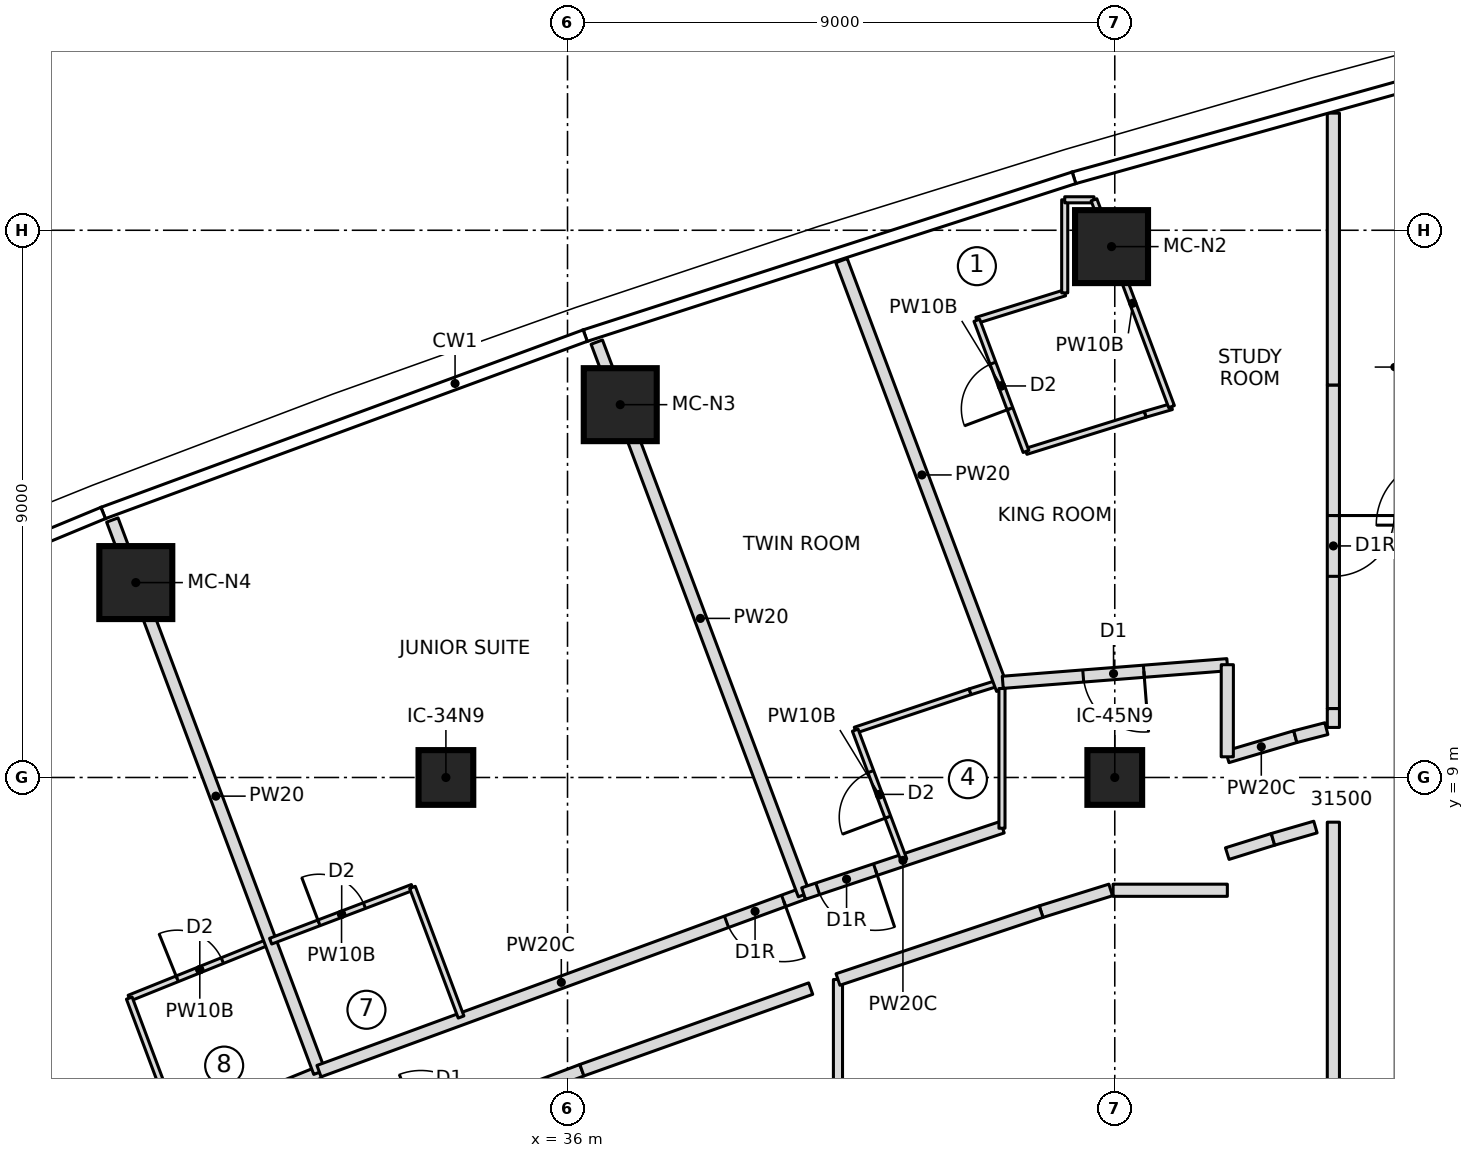
"""IFC4 building model, lengths in metres.
Left out: names, types, materials, properties, quantities, classifications, styles, units other than length and angle.
Written with IfcOpenShell. Run it as: python <this file> out.ifc"""

import sys

from ifc_helpers import new_model, si_unit, direction, frame, frame_2d, origin, origin_2d, place, context, subcontext, project, spatial, rectangle, extrude, element, fill, save


model = new_model("IFC4")
c1 = context("Model", 3, precision=1e-05, world=origin(), true_north=direction((0.0, 1.0)))
c2 = subcontext(c1, "Body", "Model", "MODEL_VIEW")
j1 = project(units=[si_unit("LENGTHUNIT", "METRE"), si_unit("PLANEANGLEUNIT", "RADIAN")], contexts=[c1])
p1 = place(None, origin())
s1 = spatial("IfcSite", under=j1, at=p1, CompositionType="ELEMENT")
p2 = place(p1, origin())
s2 = spatial("IfcBuilding", under=s1, at=p2, CompositionType="ELEMENT")
p3 = place(p2, frame((0.0, 0.0, 224.35)))
s3 = spatial("IfcBuildingStorey", under=s2, at=p3, CompositionType="ELEMENT", Elevation=224.35)
for number, where, z_axis, x_axis in (
    (1, (44.947, 17.731, 0.0), (0.0, 0.0, 1.0), (1.0, 0.0, 0.0)),
    (2, (36.867, 15.132, 0.0), (0.0, 0.0, 1.0), (1.0, 0.0, 0.0)),
    (3, (28.9, 12.205, 0.0), (0.0, 0.0, 1.0), (1.0, 0.0, 0.0)),
):
    element("IfcColumn", number, at=place(p3, frame(where, z_axis=z_axis, x_axis=x_axis)), inside=s3, PredefinedType="COLUMN", context=c2, shape_type="SweptSolid", body=[
        extrude(rectangle(XDim=1.2, YDim=1.2, at=origin_2d()), origin(), (0.0, 0.0, 1.0), 3.55),
    ])
for number, where, z_axis, x_axis in (
    (4, (34.0, 9.0, 0.0), (0.0, 0.0, 1.0), (1.0, 0.0, 0.0)),
    (5, (45.0, 9.0, 0.0), (0.0, 0.0, 1.0), (1.0, 0.0, 0.0)),
):
    element("IfcColumn", number, at=place(p3, frame(where, z_axis=z_axis, x_axis=x_axis)), inside=s3, PredefinedType="COLUMN", context=c2, shape_type="SweptSolid", body=[
        extrude(rectangle(XDim=0.9, YDim=0.9, at=origin_2d()), origin(), (0.0, 0.0, 1.0), 3.55),
    ])
p4 = place(p3, frame((26.266, 1.85, 0.0), z_axis=(0.0, 0.0, 1.0), x_axis=(0.926231512449, 0.376955150311, 0.0)))
e6 = element("IfcWall", 6, at=p4, inside=s3, PredefinedType="PARTITIONING", context=c2, shape_type="SweptSolid", body=[
    extrude(rectangle(XDim=6.105, YDim=0.2, at=frame_2d((3.052, 0.0))), origin(), (0.0, 0.0, 1.0), 3.25),
])
p5 = place(p4, frame((0.35, 0.0, 0.0)))
e7 = element("IfcOpeningElement", 7, at=p5, cuts=e6, PredefinedType="OPENING", context=c2, shape_type="SweptSolid", body=[
    extrude(rectangle(XDim=1.0, YDim=2.1, at=frame_2d((0.5, 1.05))), frame((0.0, 0.11, 0.0), z_axis=(0.0, -1.0, 0.0), x_axis=(1.0, 0.0, 0.0)), (0.0, 0.0, 1.0), 0.22),
])
p6 = place(p3, frame((28.793, 5.372, 0.0), z_axis=(0.0, 0.0, 1.0), x_axis=(0.92761232595, 0.373544338394, 0.0)))
e8 = element("IfcWall", 8, at=p6, inside=s3, PredefinedType="PARTITIONING", context=c2, shape_type="SweptSolid", body=[
    extrude(rectangle(XDim=2.5, YDim=0.1, at=frame_2d((1.25, 0.0))), origin(), (0.0, 0.0, 1.0), 3.25),
])
p7 = place(p6, frame((0.85, 0.0, 0.0)))
e9 = element("IfcOpeningElement", 9, at=p7, cuts=e8, PredefinedType="OPENING", context=c2, shape_type="SweptSolid", body=[
    extrude(rectangle(XDim=0.8, YDim=2.1, at=frame_2d((0.4, 1.05))), frame((0.0, 0.06, 0.0), z_axis=(0.0, -1.0, 0.0), x_axis=(1.0, 0.0, 0.0)), (0.0, 0.0, 1.0), 0.12),
])
p8 = place(p3, frame((29.593, 3.239, 0.0), z_axis=(0.0, 0.0, 1.0), x_axis=(-0.351158682313, 0.936315961541, 0.0)))
e10 = element("IfcWall", 10, at=p8, inside=s3, PredefinedType="PARTITIONING", context=c2, shape_type="SweptSolid", body=[
    extrude(rectangle(XDim=2.278, YDim=0.1, at=frame_2d((1.139, 0.0))), origin(), (0.0, 0.0, 1.0), 3.25),
])
p9 = place(p3, frame((31.92, 4.151, 0.0), z_axis=(0.0, 0.0, 1.0), x_axis=(-0.351126199585, 0.936328143316, 0.0)))
e11 = element("IfcWall", 11, at=p9, inside=s3, PredefinedType="PARTITIONING", context=c2, shape_type="SweptSolid", body=[
    extrude(rectangle(XDim=9.701, YDim=0.2, at=frame_2d((4.851, 0.0))), origin(), (0.0, 0.0, 1.0), 3.25),
])
p10 = place(p3, frame((39.882, 7.091, 0.0), z_axis=(0.0, 0.0, 1.0), x_axis=(-0.938916907106, -0.344143925634, 0.0)))
e12 = element("IfcWall", 12, at=p10, inside=s3, PredefinedType="PARTITIONING", context=c2, shape_type="SweptSolid", body=[
    extrude(rectangle(XDim=8.488, YDim=0.2, at=frame_2d((4.244, 0.0))), origin(), (0.0, 0.0, 1.0), 3.25),
])
p11 = place(p10, frame((0.35, 0.0, 0.0)))
e13 = element("IfcOpeningElement", 13, at=p11, cuts=e12, PredefinedType="OPENING", context=c2, shape_type="SweptSolid", body=[
    extrude(rectangle(XDim=1.0, YDim=2.1, at=frame_2d((0.5, 1.05))), frame((0.0, 0.11, 0.0), z_axis=(0.0, -1.0, 0.0), x_axis=(1.0, 0.0, 0.0)), (0.0, 0.0, 1.0), 0.22),
])
p12 = place(p3, frame((31.117, 6.308, 0.0), z_axis=(0.0, 0.0, 1.0), x_axis=(0.93495051617, 0.354778145202, 0.0)))
e14 = element("IfcWall", 14, at=p12, inside=s3, PredefinedType="PARTITIONING", context=c2, shape_type="SweptSolid", body=[
    extrude(rectangle(XDim=2.495, YDim=0.1, at=frame_2d((1.247, 0.0))), origin(), (0.0, 0.0, 1.0), 3.25),
])
p13 = place(p12, frame((0.85, 0.0, 0.0)))
e15 = element("IfcOpeningElement", 15, at=p13, cuts=e14, PredefinedType="OPENING", context=c2, shape_type="SweptSolid", body=[
    extrude(rectangle(XDim=0.8, YDim=2.1, at=frame_2d((0.4, 1.05))), frame((0.0, 0.06, 0.0), z_axis=(0.0, -1.0, 0.0), x_axis=(1.0, 0.0, 0.0)), (0.0, 0.0, 1.0), 0.12),
])
p14 = place(p3, frame((33.45, 7.193, 0.0), z_axis=(0.0, 0.0, 1.0), x_axis=(0.351135191353, -0.936324771323, 0.0)))
e16 = element("IfcWall", 16, at=p14, inside=s3, PredefinedType="PARTITIONING", context=c2, shape_type="SweptSolid", body=[
    extrude(rectangle(XDim=2.277, YDim=0.1, at=frame_2d((1.139, 0.0))), origin(), (0.0, 0.0, 1.0), 3.25),
])
p15 = place(p3, frame((39.889, 7.072, 0.0), z_axis=(0.0, 0.0, 1.0), x_axis=(-0.35112895446, 0.936327110224, 0.0)))
e17 = element("IfcWall", 17, at=p15, inside=s3, PredefinedType="PARTITIONING", context=c2, shape_type="SweptSolid", body=[
    extrude(rectangle(XDim=9.706, YDim=0.2, at=frame_2d((4.853, 0.0))), origin(), (0.0, 0.0, 1.0), 3.25),
])
p16 = place(p3, frame((43.15, 8.183, 0.0), z_axis=(0.0, 0.0, 1.0), x_axis=(-0.948477584784, -0.316844238013, 0.0)))
e18 = element("IfcWall", 18, at=p16, inside=s3, PredefinedType="PARTITIONING", context=c2, shape_type="SweptSolid", body=[
    extrude(rectangle(XDim=3.445, YDim=0.2, at=frame_2d((1.723, 0.0))), origin(), (0.0, 0.0, 1.0), 3.25),
])
p17 = place(p16, frame((2.2, 0.0, 0.0)))
e19 = element("IfcOpeningElement", 19, at=p17, cuts=e18, PredefinedType="OPENING", context=c2, shape_type="SweptSolid", body=[
    extrude(rectangle(XDim=1.0, YDim=2.1, at=frame_2d((0.5, 1.05))), frame((0.0, 0.11, 0.0), z_axis=(0.0, -1.0, 0.0), x_axis=(1.0, 0.0, 0.0)), (0.0, 0.0, 1.0), 0.22),
])
p18 = place(p3, frame((40.732, 9.779, 0.0), z_axis=(0.0, 0.0, 1.0), x_axis=(0.948499248693, 0.316779379426, 0.0)))
e20 = element("IfcWall", 20, at=p18, inside=s3, PredefinedType="PARTITIONING", context=c2, shape_type="SweptSolid", body=[
    extrude(rectangle(XDim=1.991, YDim=0.1, at=frame_2d((0.996, 0.0))), origin(), (0.0, 0.0, 1.0), 3.25),
])
p19 = place(p3, frame((42.621, 10.409, 0.0), z_axis=(0.0, 0.0, 1.0), x_axis=(0.954624465478, 0.297812239356, 0.0)))
e21 = element("IfcWall", 21, at=p19, inside=s3, PredefinedType="PARTITIONING", context=c2, shape_type="SweptSolid", body=[
    extrude(rectangle(XDim=0.511, YDim=0.1, at=frame_2d((0.255, 0.0))), origin(), (0.0, 0.0, 1.0), 3.25),
])
p20 = place(p3, frame((41.532, 7.645, 0.0), z_axis=(0.0, 0.0, 1.0), x_axis=(-0.351146927505, 0.936320370014, 0.0)))
e22 = element("IfcWall", 22, at=p20, inside=s3, PredefinedType="PARTITIONING", context=c2, shape_type="SweptSolid", body=[
    extrude(rectangle(XDim=2.278, YDim=0.1, at=frame_2d((1.139, 0.0))), origin(), (0.0, 0.0, 1.0), 3.25),
])
p21 = place(p20, frame((0.75, 0.0, 0.0)))
e23 = element("IfcOpeningElement", 23, at=p21, cuts=e22, PredefinedType="OPENING", context=c2, shape_type="SweptSolid", body=[
    extrude(rectangle(XDim=0.8, YDim=2.1, at=frame_2d((0.4, 1.05))), frame((0.0, 0.06, 0.0), z_axis=(0.0, -1.0, 0.0), x_axis=(1.0, 0.0, 0.0)), (0.0, 0.0, 1.0), 0.12),
])
p22 = place(p3, frame((43.15, 10.45, 0.0), z_axis=(0.0, 0.0, 1.0), x_axis=(-0.351119888923, 0.936330509811, 0.0)))
e24 = element("IfcWall", 24, at=p22, inside=s3, PredefinedType="PARTITIONING", context=c2, shape_type="SweptSolid", body=[
    extrude(rectangle(XDim=7.531, YDim=0.2, at=frame_2d((3.766, 0.0))), origin(), (0.0, 0.0, 1.0), 3.25),
])
p23 = place(p3, frame((47.969, 9.671, 0.0), z_axis=(0.0, 0.0, 1.0), x_axis=(-0.958867721668, -0.283853293696, 0.0)))
e25 = element("IfcWall", 25, at=p23, inside=s3, PredefinedType="PARTITIONING", context=c2, shape_type="SweptSolid", body=[
    extrude(rectangle(XDim=1.167, YDim=0.2, at=frame_2d((0.583, 0.0))), origin(), (0.0, 0.0, 1.0), 3.25),
])
p24 = place(p3, frame((42.731, 16.519, 0.0), z_axis=(0.0, 0.0, 1.0), x_axis=(0.954631901927, 0.297788401091, 0.0)))
e26 = element("IfcWall", 26, at=p24, inside=s3, PredefinedType="PARTITIONING", context=c2, shape_type="SweptSolid", body=[
    extrude(rectangle(XDim=1.514, YDim=0.1, at=frame_2d((0.757, 0.0))), origin(), (0.0, 0.0, 1.0), 3.25),
])
p25 = place(p3, frame((44.177, 16.97, 0.0), z_axis=(0.0, 0.0, 1.0), x_axis=(0.0, 1.0, 0.0)))
e27 = element("IfcWall", 27, at=p25, inside=s3, PredefinedType="PARTITIONING", context=c2, shape_type="SweptSolid", body=[
    extrude(rectangle(XDim=1.531, YDim=0.1, at=frame_2d((0.766, 0.0))), origin(), (0.0, 0.0, 1.0), 3.25),
])
p26 = place(p3, frame((44.177, 18.501, 0.0), z_axis=(0.0, 0.0, 1.0), x_axis=(1.0, 0.0, 0.0)))
e28 = element("IfcWall", 28, at=p26, inside=s3, PredefinedType="PARTITIONING", context=c2, shape_type="SweptSolid", body=[
    extrude(rectangle(XDim=0.481, YDim=0.1, at=frame_2d((0.241, 0.0))), origin(), (0.0, 0.0, 1.0), 3.25),
])
p27 = place(p3, frame((45.934, 15.099, 0.0), z_axis=(0.0, 0.0, 1.0), x_axis=(-0.960560469191, -0.278071186978, 0.0)))
e29 = element("IfcWall", 29, at=p27, inside=s3, PredefinedType="PARTITIONING", context=c2, shape_type="SweptSolid", body=[
    extrude(rectangle(XDim=0.452, YDim=0.1, at=frame_2d((0.226, 0.0))), origin(), (0.0, 0.0, 1.0), 3.25),
])
p28 = place(p3, frame((45.499, 14.973, 0.0), z_axis=(0.0, 0.0, 1.0), x_axis=(-0.954642821531, -0.297753393432, 0.0)))
e30 = element("IfcWall", 30, at=p28, inside=s3, PredefinedType="PARTITIONING", context=c2, shape_type="SweptSolid", body=[
    extrude(rectangle(XDim=2.052, YDim=0.1, at=frame_2d((1.026, 0.0))), origin(), (0.0, 0.0, 1.0), 3.25),
])
p29 = place(p3, frame((43.54, 14.362, 0.0), z_axis=(0.0, 0.0, 1.0), x_axis=(-0.351111827312, 0.936333532841, 0.0)))
e31 = element("IfcWall", 31, at=p29, inside=s3, PredefinedType="PARTITIONING", context=c2, shape_type="SweptSolid", body=[
    extrude(rectangle(XDim=2.304, YDim=0.1, at=frame_2d((1.152, 0.0))), origin(), (0.0, 0.0, 1.0), 3.25),
])
p30 = place(p29, frame((0.75, 0.0, 0.0)))
e32 = element("IfcOpeningElement", 32, at=p30, cuts=e31, PredefinedType="OPENING", context=c2, shape_type="SweptSolid", body=[
    extrude(rectangle(XDim=0.8, YDim=2.1, at=frame_2d((0.4, 1.05))), frame((0.0, 0.06, 0.0), z_axis=(0.0, -1.0, 0.0), x_axis=(1.0, 0.0, 0.0)), (0.0, 0.0, 1.0), 0.12),
])
p31 = place(p3, frame((35.556, 3.927, 0.0), z_axis=(0.0, 0.0, 1.0), x_axis=(0.934928414106, 0.354836385533, 0.0)))
e33 = element("IfcWall", 33, at=p31, inside=s3, PredefinedType="PARTITIONING", context=c2, shape_type="SweptSolid", body=[
    extrude(rectangle(XDim=0.727, YDim=0.2, at=frame_2d((0.364, 0.0))), origin(), (0.0, 0.0, 1.0), 3.25),
])
p32 = place(p3, frame((36.236, 4.186, 0.0), z_axis=(0.0, 0.0, 1.0), x_axis=(0.941909090846, 0.335867927288, 0.0)))
e34 = element("IfcWall", 34, at=p32, inside=s3, PredefinedType="PARTITIONING", context=c2, shape_type="SweptSolid", body=[
    extrude(rectangle(XDim=3.995, YDim=0.2, at=frame_2d((1.998, 0.0))), origin(), (0.0, 0.0, 1.0), 3.25),
])
p33 = place(p3, frame((40.448, -5.572, 0.0), z_axis=(0.0, 0.0, 1.0), x_axis=(0.0, 1.0, 0.0)))
e35 = element("IfcWall", 35, at=p33, inside=s3, PredefinedType="PARTITIONING", context=c2, shape_type="SweptSolid", body=[
    extrude(rectangle(XDim=11.249, YDim=0.15, at=frame_2d((5.625, 0.0))), origin(), (0.0, 0.0, 1.0), 3.25),
])
p34 = place(p3, frame((43.788, 6.793, 0.0), z_axis=(0.0, 0.0, 1.0), x_axis=(0.954693570678, 0.29759063511, 0.0)))
e36 = element("IfcWall", 36, at=p34, inside=s3, PredefinedType="PARTITIONING", context=c2, shape_type="SweptSolid", body=[
    extrude(rectangle(XDim=1.198, YDim=0.2, at=frame_2d((0.599, 0.0))), origin(), (0.0, 0.0, 1.0), 3.25),
])
p35 = place(p3, frame((46.85, 7.748, 0.0), z_axis=(0.0, 0.0, 1.0), x_axis=(0.95461224237, 0.297851417181, 0.0)))
e37 = element("IfcWall", 37, at=p35, inside=s3, PredefinedType="PARTITIONING", context=c2, shape_type="SweptSolid", body=[
    extrude(rectangle(XDim=0.788, YDim=0.2, at=frame_2d((0.394, 0.0))), origin(), (0.0, 0.0, 1.0), 3.25),
])
p36 = place(p3, frame((40.448, 5.677, 0.0), z_axis=(0.0, 0.0, 1.0), x_axis=(0.948475139593, 0.316851557632, 0.0)))
e38 = element("IfcWall", 38, at=p36, inside=s3, PredefinedType="PARTITIONING", context=c2, shape_type="SweptSolid", body=[
    extrude(rectangle(XDim=3.522, YDim=0.2, at=frame_2d((1.761, 0.0))), origin(), (0.0, 0.0, 1.0), 3.25),
])
p37 = place(p3, frame((43.145, 10.463, 0.0), z_axis=(0.0, 0.0, 1.0), x_axis=(0.0, -1.0, 0.0)))
e39 = element("IfcWall", 39, at=p37, inside=s3, PredefinedType="PARTITIONING", context=c2, shape_type="SweptSolid", body=[
    extrude(rectangle(XDim=2.298, YDim=0.1, at=frame_2d((1.149, 0.0))), origin(), (0.0, 0.0, 1.0), 3.25),
])
p38 = place(p3, frame((44.658, 18.501, 0.0), z_axis=(0.0, 0.0, 1.0), x_axis=(0.351027709609, -0.936365071479, 0.0)))
e40 = element("IfcWall", 40, at=p38, inside=s3, PredefinedType="PARTITIONING", context=c2, shape_type="SweptSolid", body=[
    extrude(rectangle(XDim=3.633, YDim=0.1, at=frame_2d((1.817, 0.0))), origin(), (0.0, 0.0, 1.0), 3.25),
])
p39 = place(p3, frame((47.602, 7.982, 0.0), z_axis=(0.0, 0.0, 1.0), x_axis=(0.960439023181, 0.278490363839, 0.0)))
e41 = element("IfcWall", 41, at=p39, inside=s3, PredefinedType="PARTITIONING", context=c2, shape_type="SweptSolid", body=[
    extrude(rectangle(XDim=0.727, YDim=0.2, at=frame_2d((0.363, 0.0))), origin(), (0.0, 0.0, 1.0), 3.25),
])
p40 = place(p3, frame((48.595, 15.455, 0.0), z_axis=(0.0, 0.0, 1.0), x_axis=(0.0, -1.0, 0.0)))
e42 = element("IfcWall", 42, at=p40, inside=s3, PredefinedType="PARTITIONING", context=c2, shape_type="SweptSolid", body=[
    extrude(rectangle(XDim=5.322, YDim=0.2, at=frame_2d((2.661, 0.0))), origin(), (0.0, 0.0, 1.0), 3.25),
])
p41 = place(p40, frame((2.147, 0.0, 0.0)))
e43 = element("IfcOpeningElement", 43, at=p41, cuts=e42, PredefinedType="OPENING", context=c2, shape_type="SweptSolid", body=[
    extrude(rectangle(XDim=1.0, YDim=2.1, at=frame_2d((0.5, 1.05))), frame((0.0, 0.11, 0.0), z_axis=(0.0, -1.0, 0.0), x_axis=(1.0, 0.0, 0.0)), (0.0, 0.0, 1.0), 0.22),
])
p42 = place(p3, frame((46.851, 10.855, 0.0), z_axis=(0.0, 0.0, 1.0), x_axis=(-0.996940593543, -0.078162989617, 0.0)))
e44 = element("IfcWall", 44, at=p42, inside=s3, PredefinedType="PARTITIONING", context=c2, shape_type="SweptSolid", body=[
    extrude(rectangle(XDim=3.704, YDim=0.2, at=frame_2d((1.852, 0.0))), origin(), (0.0, 0.0, 1.0), 3.25),
])
p43 = place(p42, frame((1.377, 0.0, 0.0)))
e45 = element("IfcOpeningElement", 45, at=p43, cuts=e44, PredefinedType="OPENING", context=c2, shape_type="SweptSolid", body=[
    extrude(rectangle(XDim=1.0, YDim=2.1, at=frame_2d((0.5, 1.05))), frame((0.0, 0.11, 0.0), z_axis=(0.0, -1.0, 0.0), x_axis=(1.0, 0.0, 0.0)), (0.0, 0.0, 1.0), 0.22),
])
p44 = place(p3, frame((44.972, 7.145, 0.0), z_axis=(0.0, 0.0, 1.0), x_axis=(0.99999999156, 0.000129920747, 0.0)))
e46 = element("IfcWall", 46, at=p44, inside=s3, PredefinedType="PARTITIONING", context=c2, shape_type="SweptSolid", body=[
    extrude(rectangle(XDim=1.879, YDim=0.2, at=frame_2d((0.939, 0.0))), origin(), (0.0, 0.0, 1.0), 3.25),
])
p45 = place(p3, frame((48.595, 8.265, 0.0), z_axis=(0.0, 0.0, 1.0), x_axis=(0.0, -1.0, 0.0)))
e47 = element("IfcWall", 47, at=p45, inside=s3, PredefinedType="PARTITIONING", context=c2, shape_type="SweptSolid", body=[
    extrude(rectangle(XDim=16.53, YDim=0.2, at=frame_2d((8.265, 0.0))), origin(), (0.0, 0.0, 1.0), 3.25),
])
p46 = place(p3, frame((46.85, 9.34, 0.0), z_axis=(0.0, 0.0, 1.0), x_axis=(0.000644641284, 0.999999792219, 0.0)))
e48 = element("IfcWall", 48, at=p46, inside=s3, PredefinedType="PARTITIONING", context=c2, shape_type="SweptSolid", body=[
    extrude(rectangle(XDim=1.515, YDim=0.2, at=frame_2d((0.757, 0.0))), origin(), (0.0, 0.0, 1.0), 3.25),
])
p47 = place(p3, frame((48.595, 19.927, 0.0), z_axis=(0.0, 0.0, 1.0), x_axis=(0.0, -1.0, 0.0)))
e49 = element("IfcWall", 49, at=p47, inside=s3, PredefinedType="PARTITIONING", context=c2, shape_type="SweptSolid", body=[
    extrude(rectangle(XDim=4.472, YDim=0.2, at=frame_2d((2.236, 0.0))), origin(), (0.0, 0.0, 1.0), 3.25),
])
p48 = place(p3, frame((48.595, 10.133, 0.0), z_axis=(0.0, 0.0, 1.0), x_axis=(0.0, -1.0, 0.0)))
e50 = element("IfcWall", 50, at=p48, inside=s3, PredefinedType="PARTITIONING", context=c2, shape_type="SweptSolid", body=[
    extrude(rectangle(XDim=0.31, YDim=0.2, at=frame_2d((0.155, 0.0))), origin(), (0.0, 0.0, 1.0), 3.25),
])
p49 = place(p3, frame((48.48, 9.803, 0.0), z_axis=(0.0, 0.0, 1.0), x_axis=(-0.968262872428, -0.249934011047, 0.0)))
e51 = element("IfcWall", 51, at=p49, inside=s3, PredefinedType="PARTITIONING", context=c2, shape_type="SweptSolid", body=[
    extrude(rectangle(XDim=0.528, YDim=0.2, at=frame_2d((0.264, 0.0))), origin(), (0.0, 0.0, 1.0), 3.25),
])
p50 = place(p7, origin())
e52 = element("IfcDoor", 52, at=p50, inside=s3, OperationType="SINGLE_SWING_LEFT", PredefinedType="DOOR", context=c2, shape_type="SweptSolid", body=[
    extrude(rectangle(XDim=0.8, YDim=2.1, at=frame_2d((0.4, 1.05))), frame((0.0, 0.025, 0.0), z_axis=(0.0, -1.0, 0.0), x_axis=(1.0, 0.0, 0.0)), (0.0, 0.0, 1.0), 0.05),
])
fill(e9, e52)
p51 = place(p13, origin())
e53 = element("IfcDoor", 53, at=p51, inside=s3, OperationType="SINGLE_SWING_LEFT", PredefinedType="DOOR", context=c2, shape_type="SweptSolid", body=[
    extrude(rectangle(XDim=0.8, YDim=2.1, at=frame_2d((0.4, 1.05))), frame((0.0, 0.025, 0.0), z_axis=(0.0, -1.0, 0.0), x_axis=(1.0, 0.0, 0.0)), (0.0, 0.0, 1.0), 0.05),
])
fill(e15, e53)
p52 = place(p11, origin())
e54 = element("IfcDoor", 54, at=p52, inside=s3, OperationType="SINGLE_SWING_RIGHT", PredefinedType="DOOR", context=c2, shape_type="SweptSolid", body=[
    extrude(rectangle(XDim=1.0, YDim=2.1, at=frame_2d((0.5, 1.05))), frame((0.0, 0.025, 0.0), z_axis=(0.0, -1.0, 0.0), x_axis=(1.0, 0.0, 0.0)), (0.0, 0.0, 1.0), 0.05),
])
fill(e13, e54)
p53 = place(p21, origin())
e55 = element("IfcDoor", 55, at=p53, inside=s3, OperationType="SINGLE_SWING_LEFT", PredefinedType="DOOR", context=c2, shape_type="SweptSolid", body=[
    extrude(rectangle(XDim=0.8, YDim=2.1, at=frame_2d((0.4, 1.05))), frame((0.0, 0.025, 0.0), z_axis=(0.0, -1.0, 0.0), x_axis=(1.0, 0.0, 0.0)), (0.0, 0.0, 1.0), 0.05),
])
fill(e23, e55)
p54 = place(p17, origin())
e56 = element("IfcDoor", 56, at=p54, inside=s3, OperationType="SINGLE_SWING_RIGHT", PredefinedType="DOOR", context=c2, shape_type="SweptSolid", body=[
    extrude(rectangle(XDim=1.0, YDim=2.1, at=frame_2d((0.5, 1.05))), frame((0.0, 0.025, 0.0), z_axis=(0.0, -1.0, 0.0), x_axis=(1.0, 0.0, 0.0)), (0.0, 0.0, 1.0), 0.05),
])
fill(e19, e56)
p55 = place(p30, origin())
e57 = element("IfcDoor", 57, at=p55, inside=s3, OperationType="SINGLE_SWING_LEFT", PredefinedType="DOOR", context=c2, shape_type="SweptSolid", body=[
    extrude(rectangle(XDim=0.8, YDim=2.1, at=frame_2d((0.4, 1.05))), frame((0.0, 0.025, 0.0), z_axis=(0.0, -1.0, 0.0), x_axis=(1.0, 0.0, 0.0)), (0.0, 0.0, 1.0), 0.05),
])
fill(e32, e57)
p56 = place(p41, origin())
e58 = element("IfcDoor", 58, at=p56, inside=s3, OperationType="SINGLE_SWING_RIGHT", PredefinedType="DOOR", context=c2, shape_type="SweptSolid", body=[
    extrude(rectangle(XDim=1.0, YDim=2.1, at=frame_2d((0.5, 1.05))), frame((0.0, 0.025, 0.0), z_axis=(0.0, -1.0, 0.0), x_axis=(1.0, 0.0, 0.0)), (0.0, 0.0, 1.0), 0.05),
])
fill(e43, e58)
p57 = place(p43, origin())
e59 = element("IfcDoor", 59, at=p57, inside=s3, OperationType="SINGLE_SWING_LEFT", PredefinedType="DOOR", context=c2, shape_type="SweptSolid", body=[
    extrude(rectangle(XDim=1.0, YDim=2.1, at=frame_2d((0.5, 1.05))), frame((0.0, 0.025, 0.0), z_axis=(0.0, -1.0, 0.0), x_axis=(1.0, 0.0, 0.0)), (0.0, 0.0, 1.0), 0.05),
])
fill(e45, e59)
save(model, sys.argv[1])
